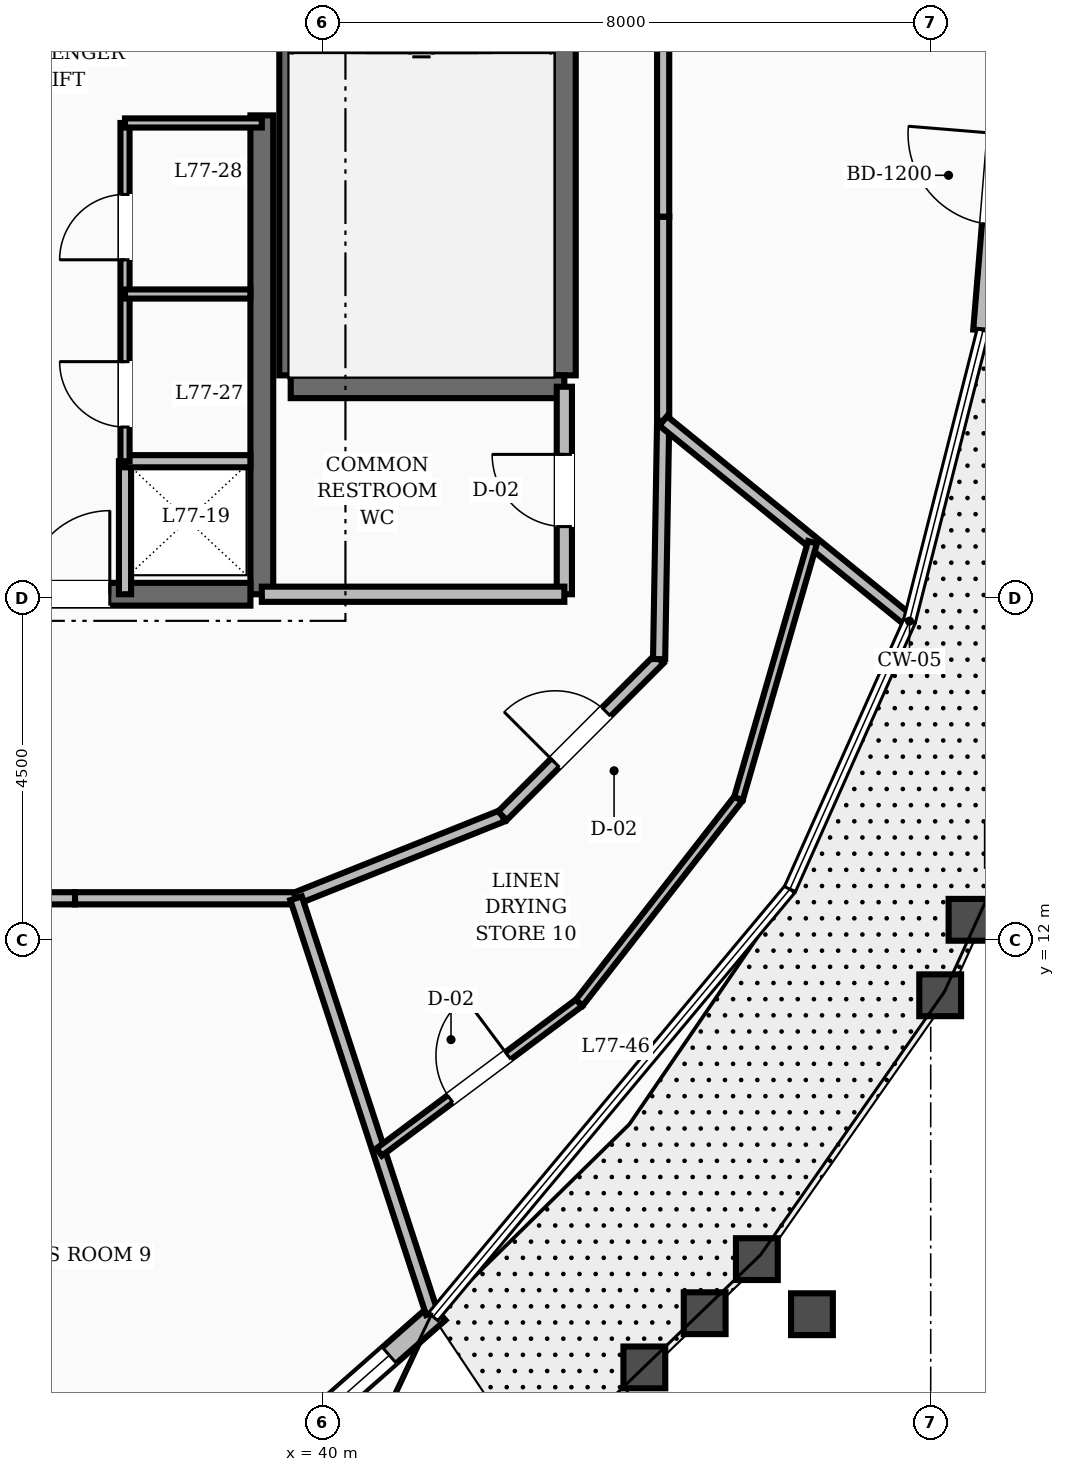
"""IFC4 building model, lengths in metres.
Left out: names, types, materials, properties, quantities, classifications, styles, units other than length and angle.
Written with IfcOpenShell. Run it as: python <this file> out.ifc"""

import sys

from ifc_helpers import new_model, si_unit, direction, frame, frame_2d, origin, place, context, subcontext, project, spatial, rectangle, extrude, element, fill, save


model = new_model("IFC4")
c1 = context("Model", 3, precision=1e-05, world=origin(), true_north=direction((0.0, 1.0)))
c2 = subcontext(c1, "Body", "Model", "MODEL_VIEW")
j1 = project(units=[si_unit("LENGTHUNIT", "METRE"), si_unit("PLANEANGLEUNIT", "RADIAN")], contexts=[c1])
p1 = place(None, origin())
s1 = spatial("IfcSite", under=j1, at=p1, CompositionType="ELEMENT")
p2 = place(p1, origin())
s2 = spatial("IfcBuilding", under=s1, at=p2, CompositionType="ELEMENT")
p3 = place(p2, frame((0.0, 0.0, 294.0)))
s3 = spatial("IfcBuildingStorey", under=s2, at=p3, CompositionType="ELEMENT", Elevation=294.0)
p4 = place(p3, frame((39.2, 16.55, 0.0), z_axis=(0.0, 0.0, 1.0), x_axis=(0.0, 1.0, 0.0)))
e1 = element("IfcWall", 1, at=p4, inside=s3, PredefinedType="SHEAR", context=c2, shape_type="SweptSolid", body=[
    extrude(rectangle(XDim=6.3, YDim=0.3, at=frame_2d((3.15, 0.0))), origin(), (0.0, 0.0, 1.0), 3.6),
])
p5 = place(p3, frame((35.8, 16.55, 0.0), z_axis=(0.0, 0.0, 1.0), x_axis=(1.0, 0.0, 0.0)))
e2 = element("IfcWall", 2, at=p5, inside=s3, PredefinedType="SHEAR", context=c2, shape_type="SweptSolid", body=[
    extrude(rectangle(XDim=3.25, YDim=0.3, at=frame_2d((1.625, 0.0))), origin(), (0.0, 0.0, 1.0), 3.6),
])
p6 = place(p5, frame((0.3, 0.0, 0.0)))
e3 = element("IfcOpeningElement", 3, at=p6, cuts=e2, PredefinedType="OPENING", context=c2, shape_type="SweptSolid", body=[
    extrude(rectangle(XDim=1.1, YDim=2.1, at=frame_2d((0.55, 1.05))), frame((0.0, 0.16, 0.0), z_axis=(0.0, -1.0, 0.0), x_axis=(1.0, 0.0, 0.0)), (0.0, 0.0, 1.0), 0.32),
])
for number, where, z_axis, x_axis in (
    (4, (43.18, 19.43, 0.0), (0.0, 0.0, 1.0), (0.0, 1.0, 0.0)),
    (5, (39.58, 19.43, 0.0), (0.0, 0.0, 1.0), (0.0, 1.0, 0.0)),
):
    element("IfcWall", number, at=place(p3, frame(where, z_axis=z_axis, x_axis=x_axis)), inside=s3, PredefinedType="SHEAR", context=c2, shape_type="SweptSolid", body=[
        extrude(rectangle(XDim=8.74, YDim=0.3, at=frame_2d((4.37, 0.0))), origin(), (0.0, 0.0, 1.0), 3.6),
    ])
p7 = place(p3, frame((39.58, 19.28, 0.0), z_axis=(0.0, 0.0, 1.0), x_axis=(1.0, 0.0, 0.0)))
e6 = element("IfcWall", 6, at=p7, inside=s3, PredefinedType="SHEAR", context=c2, shape_type="SweptSolid", body=[
    extrude(rectangle(XDim=3.6, YDim=0.3, at=frame_2d((1.8, 0.0))), origin(), (0.0, 0.0, 1.0), 3.6),
])
p8 = place(p3, frame((38.726, 4.643, 0.0), z_axis=(0.0, 0.0, 1.0), x_axis=(0.75049902536, 0.660871555549, 0.0)))
e7 = element("IfcWall", 7, at=p8, inside=s3, PredefinedType="STANDARD", context=c2, shape_type="SweptSolid", body=[
    extrude(rectangle(XDim=3.726, YDim=0.28, at=frame_2d((1.863, 0.0))), origin(), (0.0, 0.0, 1.0), 2.82),
])
p9 = place(p8, frame((0.767, 0.0, 0.8)))
e8 = element("IfcOpeningElement", 8, at=p9, cuts=e7, PredefinedType="OPENING", context=c2, shape_type="SweptSolid", body=[
    extrude(rectangle(XDim=2.1, YDim=1.65, at=frame_2d((1.05, 0.825))), frame((0.0, 0.15, 0.0), z_axis=(0.0, -1.0, 0.0), x_axis=(1.0, 0.0, 0.0)), (0.0, 0.0, 1.0), 0.3),
])
p10 = place(p3, frame((48.689, 20.022, 0.0), z_axis=(0.0, 0.0, 1.0), x_axis=(0.081957167383, 0.996635852613, 0.0)))
e9 = element("IfcWall", 9, at=p10, inside=s3, PredefinedType="STANDARD", context=c2, shape_type="SweptSolid", body=[
    extrude(rectangle(XDim=3.992, YDim=0.26, at=frame_2d((1.996, 0.0))), origin(), (0.0, 0.0, 1.0), 2.82),
])
p11 = place(p10, frame((1.396, 0.0, 0.0)))
e10 = element("IfcOpeningElement", 10, at=p11, cuts=e9, PredefinedType="OPENING", context=c2, shape_type="SweptSolid", body=[
    extrude(rectangle(XDim=1.2, YDim=2.15, at=frame_2d((0.6, 1.075))), frame((0.0, 0.14, 0.0), z_axis=(0.0, -1.0, 0.0), x_axis=(1.0, 0.0, 0.0)), (0.0, 0.0, 1.0), 0.28),
])
p12 = place(p3, frame((43.18, 16.55, 0.0), z_axis=(0.0, 0.0, 1.0), x_axis=(0.0, 1.0, 0.0)))
e11 = element("IfcWall", 11, at=p12, inside=s3, PredefinedType="SOLIDWALL", context=c2, shape_type="SweptSolid", body=[
    extrude(rectangle(XDim=2.73, YDim=0.2, at=frame_2d((1.365, 0.0))), origin(), (0.0, 0.0, 1.0), 2.81),
])
p13 = place(p12, frame((0.89, 0.0, 0.0)))
e12 = element("IfcOpeningElement", 12, at=p13, cuts=e11, PredefinedType="OPENING", context=c2, shape_type="SweptSolid", body=[
    extrude(rectangle(XDim=0.95, YDim=2.1, at=frame_2d((0.475, 1.05))), frame((0.0, 0.11, 0.0), z_axis=(0.0, -1.0, 0.0), x_axis=(1.0, 0.0, 0.0)), (0.0, 0.0, 1.0), 0.22),
])
p14 = place(p3, frame((39.2, 16.55, 0.0), z_axis=(0.0, 0.0, 1.0), x_axis=(1.0, 0.0, 0.0)))
e13 = element("IfcWall", 13, at=p14, inside=s3, PredefinedType="SOLIDWALL", context=c2, shape_type="SweptSolid", body=[
    extrude(rectangle(XDim=3.98, YDim=0.2, at=frame_2d((1.99, 0.0))), origin(), (0.0, 0.0, 1.0), 2.81),
])
p15 = place(p3, frame((37.4, 16.55, 0.0), z_axis=(0.0, 0.0, 1.0), x_axis=(0.0, 1.0, 0.0)))
e14 = element("IfcWall", 14, at=p15, inside=s3, PredefinedType="SOLIDWALL", context=c2, shape_type="SweptSolid", body=[
    extrude(rectangle(XDim=1.75, YDim=0.16, at=frame_2d((0.875, 0.0))), origin(), (0.0, 0.0, 1.0), 2.81),
])
p16 = place(p3, frame((37.4, 18.3, 0.0), z_axis=(0.0, 0.0, 1.0), x_axis=(1.0, 0.0, 0.0)))
e15 = element("IfcWall", 15, at=p16, inside=s3, PredefinedType="SOLIDWALL", context=c2, shape_type="SweptSolid", body=[
    extrude(rectangle(XDim=1.65, YDim=0.16, at=frame_2d((0.825, 0.0))), origin(), (0.0, 0.0, 1.0), 2.81),
])
p17 = place(p3, frame((37.4, 18.3, 0.0), z_axis=(0.0, 0.0, 1.0), x_axis=(0.0, 1.0, 0.0)))
e16 = element("IfcWall", 16, at=p17, inside=s3, PredefinedType="PARTITIONING", context=c2, shape_type="SweptSolid", body=[
    extrude(rectangle(XDim=4.45, YDim=0.12, at=frame_2d((2.225, 0.0))), origin(), (0.0, 0.0, 1.0), 2.81),
])
p18 = place(p17, frame((0.45, 0.0, 0.0)))
e17 = element("IfcOpeningElement", 17, at=p18, cuts=e16, PredefinedType="OPENING", context=c2, shape_type="SweptSolid", body=[
    extrude(rectangle(XDim=0.86, YDim=2.1, at=frame_2d((0.43, 1.05))), frame((0.0, 0.07, 0.0), z_axis=(0.0, -1.0, 0.0), x_axis=(1.0, 0.0, 0.0)), (0.0, 0.0, 1.0), 0.14),
])
p19 = place(p17, frame((2.65, 0.0, 0.0)))
e18 = element("IfcOpeningElement", 18, at=p19, cuts=e16, PredefinedType="OPENING", context=c2, shape_type="SweptSolid", body=[
    extrude(rectangle(XDim=0.86, YDim=2.1, at=frame_2d((0.43, 1.05))), frame((0.0, 0.07, 0.0), z_axis=(0.0, -1.0, 0.0), x_axis=(1.0, 0.0, 0.0)), (0.0, 0.0, 1.0), 0.14),
])
p20 = place(p3, frame((37.4, 22.75, 0.0), z_axis=(0.0, 0.0, 1.0), x_axis=(1.0, 0.0, 0.0)))
e19 = element("IfcWall", 19, at=p20, inside=s3, PredefinedType="PARTITIONING", context=c2, shape_type="SweptSolid", body=[
    extrude(rectangle(XDim=1.8, YDim=0.12, at=frame_2d((0.9, 0.0))), origin(), (0.0, 0.0, 1.0), 2.81),
])
p21 = place(p3, frame((37.4, 20.5, 0.0), z_axis=(0.0, 0.0, 1.0), x_axis=(1.0, 0.0, 0.0)))
e20 = element("IfcWall", 20, at=p21, inside=s3, PredefinedType="PARTITIONING", context=c2, shape_type="SweptSolid", body=[
    extrude(rectangle(XDim=1.65, YDim=0.12, at=frame_2d((0.825, 0.0))), origin(), (0.0, 0.0, 1.0), 2.81),
])
p22 = place(p3, frame((34.278, 12.55, 0.0), z_axis=(0.0, 0.0, 1.0), x_axis=(1.0, 0.0, 0.0)))
e21 = element("IfcWall", 21, at=p22, inside=s3, PredefinedType="SOLIDWALL", context=c2, shape_type="SweptSolid", body=[
    extrude(rectangle(XDim=2.465, YDim=0.16, at=frame_2d((1.232, 0.0))), origin(), (0.0, 0.0, 1.0), 2.81),
])
p23 = place(p22, frame((0.733, 0.0, 0.0)))
e22 = element("IfcOpeningElement", 22, at=p23, cuts=e21, PredefinedType="OPENING", context=c2, shape_type="SweptSolid", body=[
    extrude(rectangle(XDim=1.0, YDim=2.1, at=frame_2d((0.5, 1.05))), frame((0.0, 0.09, 0.0), z_axis=(0.0, -1.0, 0.0), x_axis=(1.0, 0.0, 0.0)), (0.0, 0.0, 1.0), 0.18),
])
p24 = place(p3, frame((36.743, 12.55, 0.0), z_axis=(0.0, 0.0, 1.0), x_axis=(1.0, 0.0, 0.0)))
e23 = element("IfcWall", 23, at=p24, inside=s3, PredefinedType="SOLIDWALL", context=c2, shape_type="SweptSolid", body=[
    extrude(rectangle(XDim=2.908, YDim=0.16, at=frame_2d((1.454, 0.0))), origin(), (0.0, 0.0, 1.0), 2.81),
])
p25 = place(p3, frame((39.651, 12.55, 0.0), z_axis=(0.0, 0.0, 1.0), x_axis=(0.92856882165, 0.371160266542, 0.0)))
e24 = element("IfcWall", 24, at=p25, inside=s3, PredefinedType="SOLIDWALL", context=c2, shape_type="SweptSolid", body=[
    extrude(rectangle(XDim=2.923, YDim=0.16, at=frame_2d((1.461, 0.0))), origin(), (0.0, 0.0, 1.0), 2.81),
])
p26 = place(p3, frame((42.365, 13.635, 0.0), z_axis=(0.0, 0.0, 1.0), x_axis=(0.707106781187, 0.707106781187, 0.0)))
e25 = element("IfcWall", 25, at=p26, inside=s3, PredefinedType="SOLIDWALL", context=c2, shape_type="SweptSolid", body=[
    extrude(rectangle(XDim=2.916, YDim=0.16, at=frame_2d((1.458, 0.0))), origin(), (0.0, 0.0, 1.0), 2.81),
])
p27 = place(p26, frame((0.983, 0.0, 0.0)))
e26 = element("IfcOpeningElement", 26, at=p27, cuts=e25, PredefinedType="OPENING", context=c2, shape_type="SweptSolid", body=[
    extrude(rectangle(XDim=0.95, YDim=2.1, at=frame_2d((0.475, 1.05))), frame((0.0, 0.09, 0.0), z_axis=(0.0, -1.0, 0.0), x_axis=(1.0, 0.0, 0.0)), (0.0, 0.0, 1.0), 0.18),
])
p28 = place(p3, frame((44.427, 15.697, 0.0), z_axis=(0.0, 0.0, 1.0), x_axis=(0.016981035134, 0.999855811828, 0.0)))
e27 = element("IfcWall", 27, at=p28, inside=s3, PredefinedType="SOLIDWALL", context=c2, shape_type="SweptSolid", body=[
    extrude(rectangle(XDim=3.134, YDim=0.16, at=frame_2d((1.567, 0.0))), origin(), (0.0, 0.0, 1.0), 2.81),
])
p29 = place(p3, frame((44.48, 18.831, 0.0), z_axis=(0.0, 0.0, 1.0), x_axis=(0.0, 1.0, 0.0)))
e28 = element("IfcWall", 28, at=p29, inside=s3, PredefinedType="SOLIDWALL", context=c2, shape_type="SweptSolid", body=[
    extrude(rectangle(XDim=2.687, YDim=0.16, at=frame_2d((1.344, 0.0))), origin(), (0.0, 0.0, 1.0), 2.81),
])
p30 = place(p3, frame((44.48, 21.518, 0.0), z_axis=(0.0, 0.0, 1.0), x_axis=(0.0, 1.0, 0.0)))
e29 = element("IfcWall", 29, at=p30, inside=s3, PredefinedType="SOLIDWALL", context=c2, shape_type="SweptSolid", body=[
    extrude(rectangle(XDim=2.482, YDim=0.16, at=frame_2d((1.241, 0.0))), origin(), (0.0, 0.0, 1.0), 2.81),
])
p31 = place(p3, frame((44.48, 18.831, 0.0), z_axis=(0.0, 0.0, 1.0), x_axis=(0.775967385679, -0.630773030783, 0.0)))
e30 = element("IfcWall", 30, at=p31, inside=s3, PredefinedType="SOLIDWALL", context=c2, shape_type="SweptSolid", body=[
    extrude(rectangle(XDim=4.126, YDim=0.16, at=frame_2d((2.063, 0.0))), origin(), (0.0, 0.0, 1.0), 2.81),
])
p32 = place(p3, frame((39.651, 12.55, 0.0), z_axis=(0.0, 0.0, 1.0), x_axis=(0.311211491999, -0.950340679571, 0.0)))
e31 = element("IfcWall", 31, at=p32, inside=s3, PredefinedType="SOLIDWALL", context=c2, shape_type="SweptSolid", body=[
    extrude(rectangle(XDim=5.743, YDim=0.16, at=frame_2d((2.872, 0.0))), origin(), (0.0, 0.0, 1.0), 2.81),
])
p33 = place(p3, frame((40.744, 9.211, 0.0), z_axis=(0.0, 0.0, 1.0), x_axis=(0.801344832449, 0.598202690989, 0.0)))
e32 = element("IfcWall", 32, at=p33, inside=s3, PredefinedType="PARTITIONING", context=c2, shape_type="SweptSolid", body=[
    extrude(rectangle(XDim=3.285, YDim=0.12, at=frame_2d((1.642, 0.0))), origin(), (0.0, 0.0, 1.0), 2.81),
])
p34 = place(p33, frame((1.167, 0.0, 0.0)))
e33 = element("IfcOpeningElement", 33, at=p34, cuts=e32, PredefinedType="OPENING", context=c2, shape_type="SweptSolid", body=[
    extrude(rectangle(XDim=0.95, YDim=2.1, at=frame_2d((0.475, 1.05))), frame((0.0, 0.07, 0.0), z_axis=(0.0, -1.0, 0.0), x_axis=(1.0, 0.0, 0.0)), (0.0, 0.0, 1.0), 0.14),
])
p35 = place(p3, frame((43.376, 11.176, 0.0), z_axis=(0.0, 0.0, 1.0), x_axis=(0.615031798694, 0.788502306018, 0.0)))
e34 = element("IfcWall", 34, at=p35, inside=s3, PredefinedType="PARTITIONING", context=c2, shape_type="SweptSolid", body=[
    extrude(rectangle(XDim=3.406, YDim=0.12, at=frame_2d((1.703, 0.0))), origin(), (0.0, 0.0, 1.0), 2.81),
])
p36 = place(p3, frame((45.471, 13.862, 0.0), z_axis=(0.0, 0.0, 1.0), x_axis=(0.277715153413, 0.960663465301, 0.0)))
e35 = element("IfcWall", 35, at=p36, inside=s3, PredefinedType="PARTITIONING", context=c2, shape_type="SweptSolid", body=[
    extrude(rectangle(XDim=3.509, YDim=0.12, at=frame_2d((1.755, 0.0))), origin(), (0.0, 0.0, 1.0), 2.81),
])
p37 = place(p9, origin())
e36 = element("IfcWindow", 36, at=p37, inside=s3, PartitioningType="SINGLE_PANEL", PredefinedType="WINDOW", context=c2, shape_type="SweptSolid", body=[
    extrude(rectangle(XDim=2.1, YDim=1.65, at=frame_2d((1.05, 0.825))), frame((0.0, 0.03, 0.0), z_axis=(0.0, -1.0, 0.0), x_axis=(1.0, 0.0, 0.0)), (0.0, 0.0, 1.0), 0.06),
])
fill(e8, e36)
p38 = place(p13, origin())
e37 = element("IfcDoor", 37, at=p38, inside=s3, OperationType="SINGLE_SWING_RIGHT", PredefinedType="DOOR", context=c2, shape_type="SweptSolid", body=[
    extrude(rectangle(XDim=0.95, YDim=2.1, at=frame_2d((0.475, 1.05))), frame((0.0, 0.025, 0.0), z_axis=(0.0, -1.0, 0.0), x_axis=(1.0, 0.0, 0.0)), (0.0, 0.0, 1.0), 0.05),
])
fill(e12, e37)
p39 = place(p6, origin())
e38 = element("IfcDoor", 38, at=p39, inside=s3, OperationType="SINGLE_SWING_RIGHT", PredefinedType="DOOR", context=c2, shape_type="SweptSolid", body=[
    extrude(rectangle(XDim=1.1, YDim=2.1, at=frame_2d((0.55, 1.05))), frame((0.0, 0.025, 0.0), z_axis=(0.0, -1.0, 0.0), x_axis=(1.0, 0.0, 0.0)), (0.0, 0.0, 1.0), 0.05),
])
fill(e3, e38)
p40 = place(p18, origin())
e39 = element("IfcDoor", 39, at=p40, inside=s3, OperationType="SINGLE_SWING_RIGHT", PredefinedType="DOOR", context=c2, shape_type="SweptSolid", body=[
    extrude(rectangle(XDim=0.86, YDim=2.1, at=frame_2d((0.43, 1.05))), frame((0.0, 0.025, 0.0), z_axis=(0.0, -1.0, 0.0), x_axis=(1.0, 0.0, 0.0)), (0.0, 0.0, 1.0), 0.05),
])
fill(e17, e39)
p41 = place(p19, origin())
e40 = element("IfcDoor", 40, at=p41, inside=s3, OperationType="SINGLE_SWING_LEFT", PredefinedType="DOOR", context=c2, shape_type="SweptSolid", body=[
    extrude(rectangle(XDim=0.86, YDim=2.1, at=frame_2d((0.43, 1.05))), frame((0.0, 0.025, 0.0), z_axis=(0.0, -1.0, 0.0), x_axis=(1.0, 0.0, 0.0)), (0.0, 0.0, 1.0), 0.05),
])
fill(e18, e40)
p42 = place(p27, origin())
e41 = element("IfcDoor", 41, at=p42, inside=s3, OperationType="SINGLE_SWING_LEFT", PredefinedType="DOOR", context=c2, shape_type="SweptSolid", body=[
    extrude(rectangle(XDim=0.95, YDim=2.1, at=frame_2d((0.475, 1.05))), frame((0.0, 0.025, 0.0), z_axis=(0.0, -1.0, 0.0), x_axis=(1.0, 0.0, 0.0)), (0.0, 0.0, 1.0), 0.05),
])
fill(e26, e41)
p43 = place(p34, origin())
e42 = element("IfcDoor", 42, at=p43, inside=s3, OperationType="SINGLE_SWING_RIGHT", PredefinedType="DOOR", context=c2, shape_type="SweptSolid", body=[
    extrude(rectangle(XDim=0.95, YDim=2.1, at=frame_2d((0.475, 1.05))), frame((0.0, 0.025, 0.0), z_axis=(0.0, -1.0, 0.0), x_axis=(1.0, 0.0, 0.0)), (0.0, 0.0, 1.0), 0.05),
])
fill(e33, e42)
save(model, sys.argv[1])
